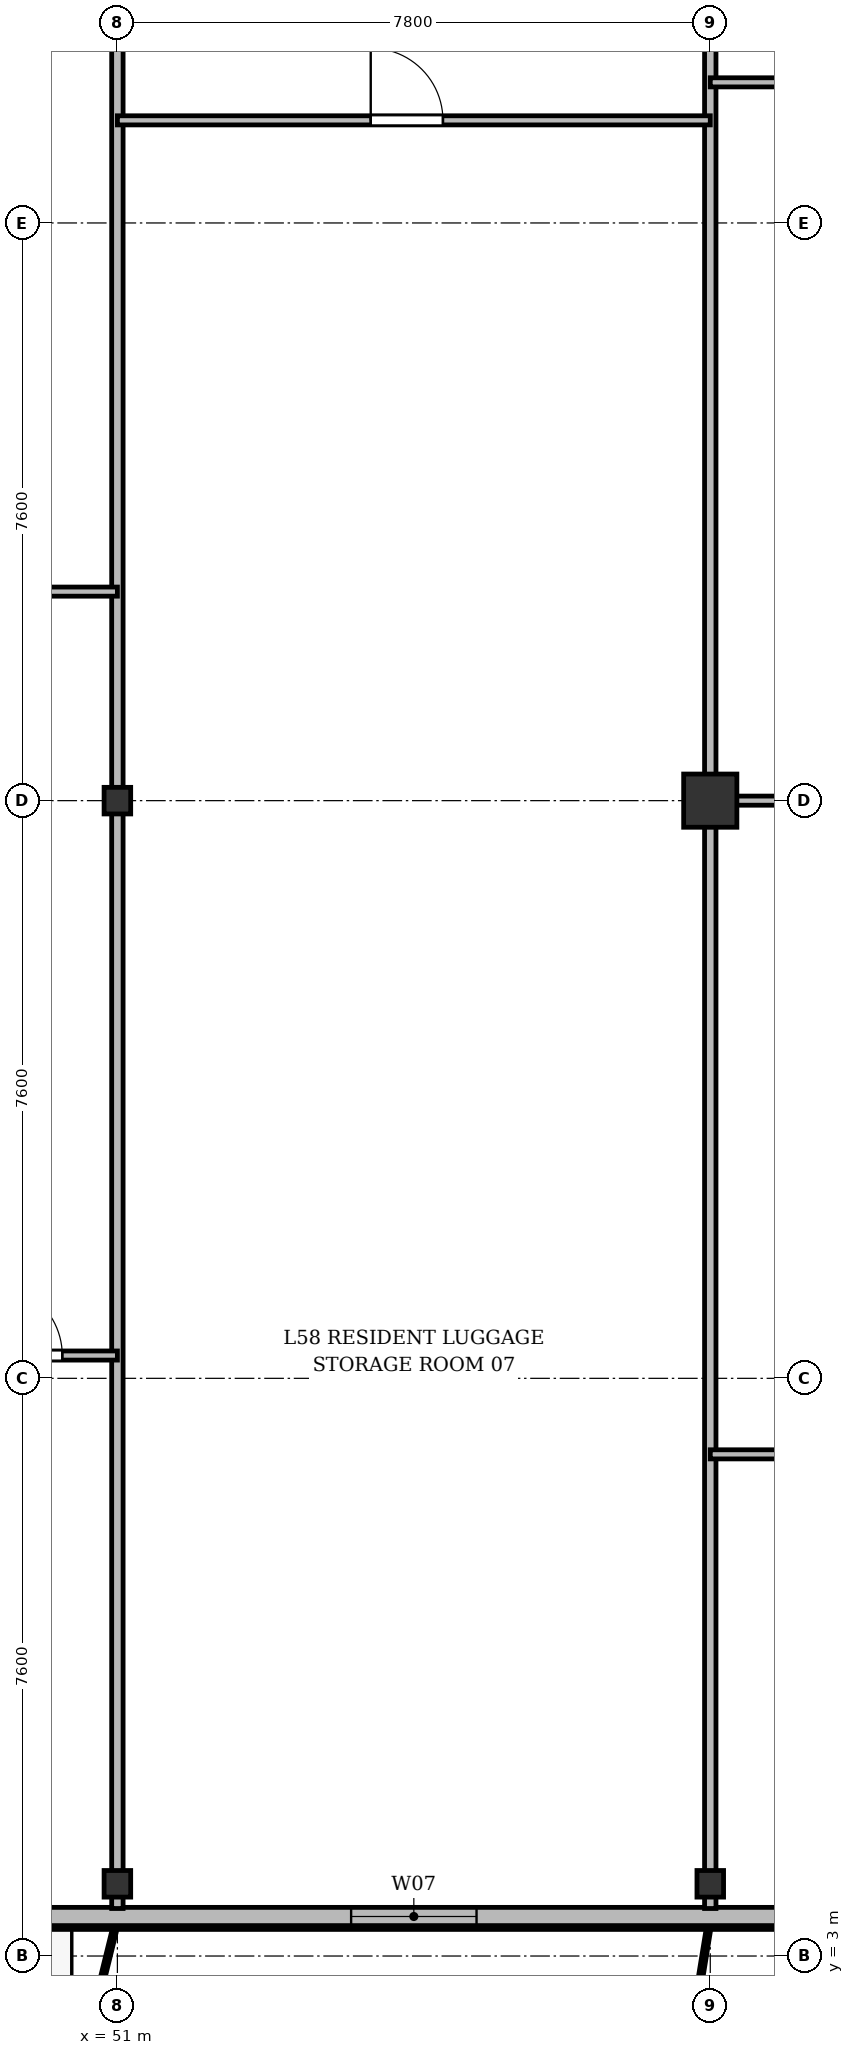
"""IFC4 building model, lengths in metres.
Left out: names, types, materials, properties, quantities, classifications, styles, units other than length and angle.
Written with IfcOpenShell. Run it as: python <this file> out.ifc"""

import sys

from ifc_helpers import new_model, si_unit, direction, frame, frame_2d, origin, origin_2d, place, context, subcontext, project, spatial, rectangle, i_section, extrude, source, transform, mapped, element, fill, save


model = new_model("IFC4")
c1 = context("Model", 3, precision=1e-05, world=origin(), true_north=direction((0.0, 1.0)))
c2 = subcontext(c1, "Body", "Model", "MODEL_VIEW")
j1 = project(units=[si_unit("LENGTHUNIT", "METRE"), si_unit("PLANEANGLEUNIT", "RADIAN")], contexts=[c1])
p1 = place(None, origin())
s1 = spatial("IfcSite", under=j1, at=p1, CompositionType="ELEMENT")
p2 = place(p1, origin())
s2 = spatial("IfcBuilding", under=s1, at=p2, CompositionType="ELEMENT")
p3 = place(p2, frame((0.0, 0.0, 222.9)))
s3 = spatial("IfcBuildingStorey", under=s2, at=p3, CompositionType="ELEMENT", Elevation=222.9)
m1 = source(origin(), c2, "Body", "SweptSolid", [
    extrude(i_section(OverallWidth=0.35, OverallDepth=0.35, WebThickness=0.018, FlangeThickness=0.028, at=origin_2d()), origin(), (0.0, 0.0, 1.0), 3.6),
])
for number, where, z_axis, x_axis in (
    (1, (51.0, 3.95, 0.0), (0.0, 0.0, 1.0), (1.0, 0.0, 0.0)),
    (2, (51.0, 18.2, 0.0), (0.0, 0.0, 1.0), (1.0, 0.0, 0.0)),
    (3, (58.8, 3.95, 0.0), (0.0, 0.0, 1.0), (1.0, 0.0, 0.0)),
):
    element("IfcColumn", number, at=place(p3, frame(where, z_axis=z_axis, x_axis=x_axis)), inside=s3, PredefinedType="COLUMN", context=c2, shape_type="MappedRepresentation", body=[
        mapped(m1, transform((0.0, 0.0, 0.0), x_axis=(1.0, 0.0, 0.0), y_axis=(0.0, 1.0, 0.0), z_axis=(0.0, 0.0, 1.0), scale=1.0)),
    ])
m2 = source(origin(), c2, "Body", "SweptSolid", [
    extrude(rectangle(XDim=0.7, YDim=0.7, at=origin_2d()), origin(), (0.0, 0.0, 1.0), 3.6),
])
p4 = place(p3, frame((58.8, 18.2, 0.0), z_axis=(0.0, 0.0, 1.0), x_axis=(1.0, 0.0, 0.0)))
e4 = element("IfcColumn", 4, at=p4, inside=s3, PredefinedType="COLUMN", context=c2, shape_type="MappedRepresentation", body=[
    mapped(m2, transform((0.0, 0.0, 0.0), x_axis=(1.0, 0.0, 0.0), y_axis=(0.0, 1.0, 0.0), z_axis=(0.0, 0.0, 1.0), scale=1.0)),
])
p5 = place(p3, frame((63.4, 3.52, 0.0), z_axis=(0.0, 0.0, 1.0), x_axis=(-1.0, 0.0, 0.0)))
e5 = element("IfcWall", 5, at=p5, inside=s3, PredefinedType="SOLIDWALL", context=c2, shape_type="SweptSolid", body=[
    extrude(rectangle(XDim=52.4, YDim=0.24, at=frame_2d((26.2, 0.0))), origin(), (0.0, 0.0, 1.0), 3.36),
])
p6 = place(p5, frame((1.345, 0.0, 0.9)))
e6 = element("IfcOpeningElement", 6, at=p6, cuts=e5, PredefinedType="OPENING", context=c2, shape_type="SweptSolid", body=[
    extrude(rectangle(XDim=2.0, YDim=1.95, at=frame_2d((1.0, 0.975))), frame((0.0, 0.13, 0.0), z_axis=(0.0, -1.0, 0.0), x_axis=(1.0, 0.0, 0.0)), (0.0, 0.0, 1.0), 0.26),
])
p7 = place(p5, frame((7.675, 0.0, 0.9)))
e7 = element("IfcOpeningElement", 7, at=p7, cuts=e5, PredefinedType="OPENING", context=c2, shape_type="SweptSolid", body=[
    extrude(rectangle(XDim=1.65, YDim=1.85, at=frame_2d((0.825, 0.925))), frame((0.0, 0.13, 0.0), z_axis=(0.0, -1.0, 0.0), x_axis=(1.0, 0.0, 0.0)), (0.0, 0.0, 1.0), 0.26),
])
p8 = place(p5, frame((13.42, 0.0, 0.0)))
e8 = element("IfcOpeningElement", 8, at=p8, cuts=e5, PredefinedType="OPENING", context=c2, shape_type="SweptSolid", body=[
    extrude(rectangle(XDim=1.2, YDim=2.2, at=frame_2d((0.6, 1.1))), frame((0.0, 0.13, 0.0), z_axis=(0.0, -1.0, 0.0), x_axis=(1.0, 0.0, 0.0)), (0.0, 0.0, 1.0), 0.26),
])
p9 = place(p5, frame((15.25, 0.0, 0.9)))
e9 = element("IfcOpeningElement", 9, at=p9, cuts=e5, PredefinedType="OPENING", context=c2, shape_type="SweptSolid", body=[
    extrude(rectangle(XDim=1.5, YDim=1.75, at=frame_2d((0.75, 0.875))), frame((0.0, 0.13, 0.0), z_axis=(0.0, -1.0, 0.0), x_axis=(1.0, 0.0, 0.0)), (0.0, 0.0, 1.0), 0.26),
])
p10 = place(p5, frame((17.65, 0.0, 0.9)))
e10 = element("IfcOpeningElement", 10, at=p10, cuts=e5, PredefinedType="OPENING", context=c2, shape_type="SweptSolid", body=[
    extrude(rectangle(XDim=1.5, YDim=1.75, at=frame_2d((0.75, 0.875))), frame((0.0, 0.13, 0.0), z_axis=(0.0, -1.0, 0.0), x_axis=(1.0, 0.0, 0.0)), (0.0, 0.0, 1.0), 0.26),
])
p11 = place(p5, frame((20.25, 0.0, 0.9)))
e11 = element("IfcOpeningElement", 11, at=p11, cuts=e5, PredefinedType="OPENING", context=c2, shape_type="SweptSolid", body=[
    extrude(rectangle(XDim=2.0, YDim=1.95, at=frame_2d((1.0, 0.975))), frame((0.0, 0.13, 0.0), z_axis=(0.0, -1.0, 0.0), x_axis=(1.0, 0.0, 0.0)), (0.0, 0.0, 1.0), 0.26),
])
p12 = place(p5, frame((23.725, 0.0, 0.9)))
e12 = element("IfcOpeningElement", 12, at=p12, cuts=e5, PredefinedType="OPENING", context=c2, shape_type="SweptSolid", body=[
    extrude(rectangle(XDim=1.65, YDim=1.85, at=frame_2d((0.825, 0.925))), frame((0.0, 0.13, 0.0), z_axis=(0.0, -1.0, 0.0), x_axis=(1.0, 0.0, 0.0)), (0.0, 0.0, 1.0), 0.26),
])
p13 = place(p5, frame((28.6, 0.0, 0.9)))
e13 = element("IfcOpeningElement", 13, at=p13, cuts=e5, PredefinedType="OPENING", context=c2, shape_type="SweptSolid", body=[
    extrude(rectangle(XDim=1.8, YDim=1.8, at=frame_2d((0.9, 0.9))), frame((0.0, 0.13, 0.0), z_axis=(0.0, -1.0, 0.0), x_axis=(1.0, 0.0, 0.0)), (0.0, 0.0, 1.0), 0.26),
])
p14 = place(p5, frame((33.5, 0.0, 0.9)))
e14 = element("IfcOpeningElement", 14, at=p14, cuts=e5, PredefinedType="OPENING", context=c2, shape_type="SweptSolid", body=[
    extrude(rectangle(XDim=2.2, YDim=1.8, at=frame_2d((1.1, 0.9))), frame((0.0, 0.13, 0.0), z_axis=(0.0, -1.0, 0.0), x_axis=(1.0, 0.0, 0.0)), (0.0, 0.0, 1.0), 0.26),
])
p15 = place(p5, frame((37.45, 0.0, 0.9)))
e15 = element("IfcOpeningElement", 15, at=p15, cuts=e5, PredefinedType="OPENING", context=c2, shape_type="SweptSolid", body=[
    extrude(rectangle(XDim=1.5, YDim=1.75, at=frame_2d((0.75, 0.875))), frame((0.0, 0.13, 0.0), z_axis=(0.0, -1.0, 0.0), x_axis=(1.0, 0.0, 0.0)), (0.0, 0.0, 1.0), 0.26),
])
p16 = place(p5, frame((41.09, 0.0, 0.0)))
e16 = element("IfcOpeningElement", 16, at=p16, cuts=e5, PredefinedType="OPENING", context=c2, shape_type="SweptSolid", body=[
    extrude(rectangle(XDim=1.2, YDim=2.2, at=frame_2d((0.6, 1.1))), frame((0.0, 0.13, 0.0), z_axis=(0.0, -1.0, 0.0), x_axis=(1.0, 0.0, 0.0)), (0.0, 0.0, 1.0), 0.26),
])
p17 = place(p5, frame((43.075, 0.0, 0.9)))
e17 = element("IfcOpeningElement", 17, at=p17, cuts=e5, PredefinedType="OPENING", context=c2, shape_type="SweptSolid", body=[
    extrude(rectangle(XDim=1.65, YDim=1.85, at=frame_2d((0.825, 0.925))), frame((0.0, 0.13, 0.0), z_axis=(0.0, -1.0, 0.0), x_axis=(1.0, 0.0, 0.0)), (0.0, 0.0, 1.0), 0.26),
])
p18 = place(p5, frame((45.6, 0.0, 0.9)))
e18 = element("IfcOpeningElement", 18, at=p18, cuts=e5, PredefinedType="OPENING", context=c2, shape_type="SweptSolid", body=[
    extrude(rectangle(XDim=1.8, YDim=1.8, at=frame_2d((0.9, 0.9))), frame((0.0, 0.13, 0.0), z_axis=(0.0, -1.0, 0.0), x_axis=(1.0, 0.0, 0.0)), (0.0, 0.0, 1.0), 0.26),
])
p19 = place(p5, frame((48.955, 0.0, 0.9)))
e19 = element("IfcOpeningElement", 19, at=p19, cuts=e5, PredefinedType="OPENING", context=c2, shape_type="SweptSolid", body=[
    extrude(rectangle(XDim=2.2, YDim=1.8, at=frame_2d((1.1, 0.9))), frame((0.0, 0.13, 0.0), z_axis=(0.0, -1.0, 0.0), x_axis=(1.0, 0.0, 0.0)), (0.0, 0.0, 1.0), 0.26),
])
for number, where, z_axis, x_axis in (
    (20, (51.0, 3.625, 0.0), (0.0, 0.0, 1.0), (0.0, 1.0, 0.0)),
    (21, (58.8, 3.625, 0.0), (0.0, 0.0, 1.0), (0.0, 1.0, 0.0)),
):
    element("IfcWall", number, at=place(p3, frame(where, z_axis=z_axis, x_axis=x_axis)), inside=s3, PredefinedType="PARTITIONING", context=c2, shape_type="SweptSolid", body=[
        extrude(rectangle(XDim=27.375, YDim=0.15, at=frame_2d((13.688, 0.0))), origin(), (0.0, 0.0, 1.0), 2.86),
    ])
p20 = place(p3, frame((43.8, 20.95, 0.0), z_axis=(0.0, 0.0, 1.0), x_axis=(1.0, 0.0, 0.0)))
e22 = element("IfcWall", 22, at=p20, inside=s3, PredefinedType="PARTITIONING", context=c2, shape_type="SweptSolid", body=[
    extrude(rectangle(XDim=7.2, YDim=0.12, at=frame_2d((3.6, 0.0))), origin(), (0.0, 0.0, 1.0), 2.86),
])
p21 = place(p20, frame((3.125, 0.0, 0.0)))
e23 = element("IfcOpeningElement", 23, at=p21, cuts=e22, PredefinedType="OPENING", context=c2, shape_type="SweptSolid", body=[
    extrude(rectangle(XDim=0.95, YDim=2.15, at=frame_2d((0.475, 1.075))), frame((0.0, 0.07, 0.0), z_axis=(0.0, -1.0, 0.0), x_axis=(1.0, 0.0, 0.0)), (0.0, 0.0, 1.0), 0.14),
])
p22 = place(p3, frame((48.6, 10.9, 0.0), z_axis=(0.0, 0.0, 1.0), x_axis=(1.0, 0.0, 0.0)))
e24 = element("IfcWall", 24, at=p22, inside=s3, PredefinedType="PARTITIONING", context=c2, shape_type="SweptSolid", body=[
    extrude(rectangle(XDim=2.4, YDim=0.12, at=frame_2d((1.2, 0.0))), origin(), (0.0, 0.0, 1.0), 2.86),
])
p23 = place(p22, frame((0.725, 0.0, 0.0)))
e25 = element("IfcOpeningElement", 25, at=p23, cuts=e24, PredefinedType="OPENING", context=c2, shape_type="SweptSolid", body=[
    extrude(rectangle(XDim=0.95, YDim=2.15, at=frame_2d((0.475, 1.075))), frame((0.0, 0.07, 0.0), z_axis=(0.0, -1.0, 0.0), x_axis=(1.0, 0.0, 0.0)), (0.0, 0.0, 1.0), 0.14),
])
p24 = place(p3, frame((51.0, 27.15, 0.0), z_axis=(0.0, 0.0, 1.0), x_axis=(1.0, 0.0, 0.0)))
e26 = element("IfcWall", 26, at=p24, inside=s3, PredefinedType="PARTITIONING", context=c2, shape_type="SweptSolid", body=[
    extrude(rectangle(XDim=7.8, YDim=0.12, at=frame_2d((3.9, 0.0))), origin(), (0.0, 0.0, 1.0), 2.86),
])
p25 = place(p24, frame((3.333, 0.0, 0.0)))
e27 = element("IfcOpeningElement", 27, at=p25, cuts=e26, PredefinedType="OPENING", context=c2, shape_type="SweptSolid", body=[
    extrude(rectangle(XDim=0.95, YDim=2.15, at=frame_2d((0.475, 1.075))), frame((0.0, 0.07, 0.0), z_axis=(0.0, -1.0, 0.0), x_axis=(1.0, 0.0, 0.0)), (0.0, 0.0, 1.0), 0.14),
])
p26 = place(p3, frame((58.8, 18.2, 0.0), z_axis=(0.0, 0.0, 1.0), x_axis=(1.0, 0.0, 0.0)))
e28 = element("IfcWall", 28, at=p26, inside=s3, PredefinedType="PARTITIONING", context=c2, shape_type="SweptSolid", body=[
    extrude(rectangle(XDim=7.36, YDim=0.12, at=frame_2d((3.68, 0.0))), origin(), (0.0, 0.0, 1.0), 2.91),
])
p27 = place(p26, frame((3.114, 0.0, 0.0)))
e29 = element("IfcOpeningElement", 29, at=p27, cuts=e28, PredefinedType="OPENING", context=c2, shape_type="SweptSolid", body=[
    extrude(rectangle(XDim=0.95, YDim=2.15, at=frame_2d((0.475, 1.075))), frame((0.0, 0.07, 0.0), z_axis=(0.0, -1.0, 0.0), x_axis=(1.0, 0.0, 0.0)), (0.0, 0.0, 1.0), 0.14),
])
p28 = place(p3, frame((58.8, 27.65, 0.0), z_axis=(0.0, 0.0, 1.0), x_axis=(1.0, 0.0, 0.0)))
e30 = element("IfcWall", 30, at=p28, inside=s3, PredefinedType="PARTITIONING", context=c2, shape_type="SweptSolid", body=[
    extrude(rectangle(XDim=2.4, YDim=0.12, at=frame_2d((1.2, 0.0))), origin(), (0.0, 0.0, 1.0), 2.86),
])
p29 = place(p3, frame((58.8, 9.6, 0.0), z_axis=(0.0, 0.0, 1.0), x_axis=(1.0, 0.0, 0.0)))
e31 = element("IfcWall", 31, at=p29, inside=s3, PredefinedType="PARTITIONING", context=c2, shape_type="SweptSolid", body=[
    extrude(rectangle(XDim=7.36, YDim=0.12, at=frame_2d((3.68, 0.0))), origin(), (0.0, 0.0, 1.0), 2.86),
])
p30 = place(p29, frame((3.114, 0.0, 0.0)))
e32 = element("IfcOpeningElement", 32, at=p30, cuts=e31, PredefinedType="OPENING", context=c2, shape_type="SweptSolid", body=[
    extrude(rectangle(XDim=0.95, YDim=2.15, at=frame_2d((0.475, 1.075))), frame((0.0, 0.07, 0.0), z_axis=(0.0, -1.0, 0.0), x_axis=(1.0, 0.0, 0.0)), (0.0, 0.0, 1.0), 0.14),
])
m3 = source(origin(), c2, "Body", "SweptSolid", [
    extrude(rectangle(XDim=1.65, YDim=1.85, at=frame_2d((0.825, 0.925))), frame((0.0, 0.03, 0.0), z_axis=(0.0, -1.0, 0.0), x_axis=(1.0, 0.0, 0.0)), (0.0, 0.0, 1.0), 0.06),
])
p31 = place(p7, origin())
e33 = element("IfcWindow", 33, at=p31, inside=s3, PartitioningType="SINGLE_PANEL", PredefinedType="WINDOW", context=c2, shape_type="MappedRepresentation", body=[
    mapped(m3, transform((0.0, 0.0, 0.0), x_axis=(1.0, 0.0, 0.0), y_axis=(0.0, 1.0, 0.0), z_axis=(0.0, 0.0, 1.0), scale=1.0)),
])
fill(e7, e33)
m4 = source(origin(), c2, "Body", "SweptSolid", [
    extrude(rectangle(XDim=0.95, YDim=2.15, at=frame_2d((0.475, 1.075))), frame((0.0, 0.025, 0.0), z_axis=(0.0, -1.0, 0.0), x_axis=(1.0, 0.0, 0.0)), (0.0, 0.0, 1.0), 0.05),
])
p32 = place(p23, origin())
e34 = element("IfcDoor", 34, at=p32, inside=s3, OperationType="SINGLE_SWING_LEFT", PredefinedType="DOOR", context=c2, shape_type="MappedRepresentation", body=[
    mapped(m4, transform((0.0, 0.0, 0.0), x_axis=(1.0, 0.0, 0.0), y_axis=(0.0, 1.0, 0.0), z_axis=(0.0, 0.0, 1.0), scale=1.0)),
])
fill(e25, e34)
p33 = place(p25, origin())
e35 = element("IfcDoor", 35, at=p33, inside=s3, OperationType="SINGLE_SWING_LEFT", PredefinedType="DOOR", context=c2, shape_type="MappedRepresentation", body=[
    mapped(m4, transform((0.0, 0.0, 0.0), x_axis=(1.0, 0.0, 0.0), y_axis=(0.0, 1.0, 0.0), z_axis=(0.0, 0.0, 1.0), scale=1.0)),
])
fill(e27, e35)
save(model, sys.argv[1])
